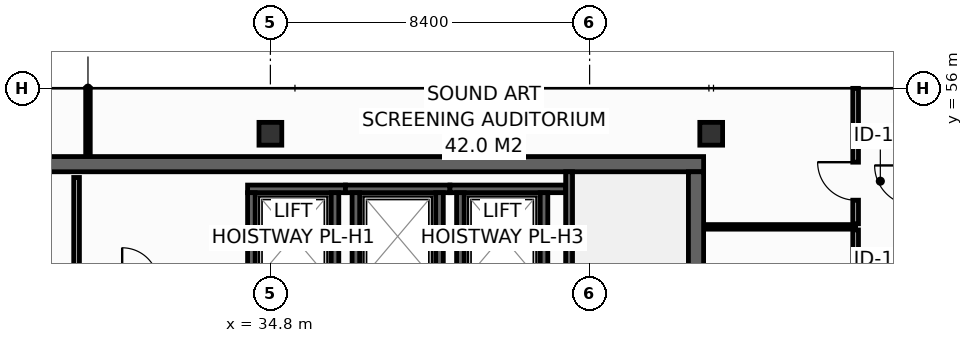
"""IFC4 building model, lengths in metres.
Left out: names, types, materials, properties, quantities, classifications, styles, units other than length and angle.
Written with IfcOpenShell. Run it as: python <this file> out.ifc"""

import sys

from ifc_helpers import new_model, si_unit, direction, frame, frame_2d, origin, origin_2d, place, context, subcontext, project, spatial, rectangle, hollow_rectangle, extrude, element, fill, save


model = new_model("IFC4")
c1 = context("Model", 3, precision=1e-05, world=origin(), true_north=direction((0.0, 1.0)))
c2 = subcontext(c1, "Body", "Model", "MODEL_VIEW")
j1 = project(units=[si_unit("LENGTHUNIT", "METRE"), si_unit("PLANEANGLEUNIT", "RADIAN")], contexts=[c1])
p1 = place(None, origin())
s1 = spatial("IfcSite", under=j1, at=p1, CompositionType="ELEMENT")
p2 = place(p1, origin())
s2 = spatial("IfcBuilding", under=s1, at=p2, CompositionType="ELEMENT")
p3 = place(p2, frame((0.0, 0.0, 291.4)))
s3 = spatial("IfcBuildingStorey", under=s2, at=p3, CompositionType="ELEMENT", Elevation=291.4)
p4 = place(p3, frame((13.7, 54.0, 0.0), z_axis=(0.0, 0.0, 1.0), x_axis=(1.0, 0.0, 0.0)))
e1 = element("IfcWall", 1, at=p4, inside=s3, PredefinedType="SHEAR", context=c2, shape_type="SweptSolid", body=[
    extrude(rectangle(XDim=32.5, YDim=0.4, at=frame_2d((16.25, 0.0))), origin(), (0.0, 0.0, 1.0), 3.55),
])
p5 = place(p3, frame((46.0, 43.4, 0.0), z_axis=(0.0, 0.0, 1.0), x_axis=(0.0, 1.0, 0.0)))
e2 = element("IfcWall", 2, at=p5, inside=s3, PredefinedType="SHEAR", context=c2, shape_type="SweptSolid", body=[
    extrude(rectangle(XDim=10.4, YDim=0.4, at=frame_2d((5.2, 0.0))), origin(), (0.0, 0.0, 1.0), 3.55),
])
for number, where, z_axis, x_axis in (
    (3, (34.8, 54.8, 0.0), (0.0, 0.0, 1.0), (1.0, 0.0, 0.0)),
    (4, (46.4, 54.8, 0.0), (0.0, 0.0, 1.0), (1.0, 0.0, 0.0)),
):
    element("IfcColumn", number, at=place(p3, frame(where, z_axis=z_axis, x_axis=x_axis)), inside=s3, PredefinedType="COLUMN", context=c2, shape_type="SweptSolid", body=[
        extrude(hollow_rectangle(XDim=0.6, YDim=0.6, WallThickness=0.028, at=origin_2d()), origin(), (0.0, 0.0, 1.0), 3.8),
    ])
p6 = place(p3, frame((34.2, 53.35, 0.0), z_axis=(0.0, 0.0, 1.0), x_axis=(1.0, 0.0, 0.0)))
e5 = element("IfcWall", 5, at=p6, inside=s3, PredefinedType="SHEAR", context=c2, shape_type="SweptSolid", body=[
    extrude(rectangle(XDim=2.575, YDim=0.2, at=frame_2d((1.288, 0.0))), origin(), (0.0, 0.0, 1.0), 3.55),
])
for number, where, z_axis, x_axis in (
    (6, (34.3, 50.95, 0.0), (0.0, 0.0, 1.0), (0.0, 1.0, 0.0)),
    (7, (36.5, 50.95, 0.0), (0.0, 0.0, 1.0), (0.0, 1.0, 0.0)),
):
    element("IfcWall", number, at=place(p3, frame(where, z_axis=z_axis, x_axis=x_axis)), inside=s3, PredefinedType="SHEAR", context=c2, shape_type="SweptSolid", body=[
        extrude(rectangle(XDim=2.3, YDim=0.2, at=frame_2d((1.15, 0.0))), origin(), (0.0, 0.0, 1.0), 3.55),
    ])
p7 = place(p3, frame((36.775, 53.35, 0.0), z_axis=(0.0, 0.0, 1.0), x_axis=(1.0, 0.0, 0.0)))
e8 = element("IfcWall", 8, at=p7, inside=s3, PredefinedType="SHEAR", context=c2, shape_type="SweptSolid", body=[
    extrude(rectangle(XDim=2.75, YDim=0.2, at=frame_2d((1.375, 0.0))), origin(), (0.0, 0.0, 1.0), 3.55),
])
for number, where, z_axis, x_axis in (
    (9, (37.05, 50.95, 0.0), (0.0, 0.0, 1.0), (0.0, 1.0, 0.0)),
    (10, (39.25, 50.95, 0.0), (0.0, 0.0, 1.0), (0.0, 1.0, 0.0)),
):
    element("IfcWall", number, at=place(p3, frame(where, z_axis=z_axis, x_axis=x_axis)), inside=s3, PredefinedType="SHEAR", context=c2, shape_type="SweptSolid", body=[
        extrude(rectangle(XDim=2.3, YDim=0.2, at=frame_2d((1.15, 0.0))), origin(), (0.0, 0.0, 1.0), 3.55),
    ])
p8 = place(p3, frame((39.525, 53.35, 0.0), z_axis=(0.0, 0.0, 1.0), x_axis=(1.0, 0.0, 0.0)))
e11 = element("IfcWall", 11, at=p8, inside=s3, PredefinedType="SHEAR", context=c2, shape_type="SweptSolid", body=[
    extrude(rectangle(XDim=3.045, YDim=0.2, at=frame_2d((1.522, 0.0))), origin(), (0.0, 0.0, 1.0), 3.55),
])
for number, where, z_axis, x_axis in (
    (12, (39.8, 50.95, 0.0), (0.0, 0.0, 1.0), (0.0, 1.0, 0.0)),
    (13, (42.0, 50.95, 0.0), (0.0, 0.0, 1.0), (0.0, 1.0, 0.0)),
):
    element("IfcWall", number, at=place(p3, frame(where, z_axis=z_axis, x_axis=x_axis)), inside=s3, PredefinedType="SHEAR", context=c2, shape_type="SweptSolid", body=[
        extrude(rectangle(XDim=2.3, YDim=0.2, at=frame_2d((1.15, 0.0))), origin(), (0.0, 0.0, 1.0), 3.55),
    ])
p9 = place(p3, frame((42.66, 53.8, 0.0), z_axis=(0.0, 0.0, 1.0), x_axis=(0.0, -1.0, 0.0)))
e14 = element("IfcWall", 14, at=p9, inside=s3, PredefinedType="SHEAR", context=c2, shape_type="SweptSolid", body=[
    extrude(rectangle(XDim=10.4, YDim=0.18, at=frame_2d((5.2, 0.0))), origin(), (0.0, 0.0, 1.0), 3.55),
])
p10 = place(p9, frame((8.99, 0.0, 0.0)))
e15 = element("IfcOpeningElement", 15, at=p10, cuts=e14, PredefinedType="OPENING", context=c2, shape_type="SweptSolid", body=[
    extrude(rectangle(XDim=1.1, YDim=2.15, at=frame_2d((0.55, 1.075))), frame((0.0, 0.1, 0.0), z_axis=(0.0, -1.0, 0.0), x_axis=(1.0, 0.0, 0.0)), (0.0, 0.0, 1.0), 0.2),
])
p11 = place(p3, frame((29.7, 50.95, 0.0), z_axis=(0.0, 0.0, 1.0), x_axis=(0.0, 1.0, 0.0)))
e16 = element("IfcWall", 16, at=p11, inside=s3, PredefinedType="PARTITIONING", context=c2, shape_type="SweptSolid", body=[
    extrude(rectangle(XDim=2.7, YDim=0.15, at=frame_2d((1.35, 0.0))), origin(), (0.0, 0.0, 1.0), 3.55),
])
p12 = place(p3, frame((46.22, 52.35, 0.0), z_axis=(0.0, 0.0, 1.0), x_axis=(1.0, 0.0, 0.0)))
e17 = element("IfcWall", 17, at=p12, inside=s3, PredefinedType="PARTITIONING", context=c2, shape_type="SweptSolid", body=[
    extrude(rectangle(XDim=3.98, YDim=0.12, at=frame_2d((1.99, 0.0))), origin(), (0.0, 0.0, 1.0), 3.55),
])
p13 = place(p3, frame((30.0, 54.22, 0.0), z_axis=(0.0, 0.0, 1.0), x_axis=(0.0, 1.0, 0.0)))
e18 = element("IfcWall", 18, at=p13, inside=s3, PredefinedType="PARTITIONING", context=c2, shape_type="SweptSolid", body=[
    extrude(rectangle(XDim=1.775, YDim=0.12, at=frame_2d((0.888, 0.0))), origin(), (0.0, 0.0, 1.0), 2.935),
])
p14 = place(p3, frame((50.2, 48.29, 0.0), z_axis=(0.0, 0.0, 1.0), x_axis=(0.0, 1.0, 0.0)))
e19 = element("IfcWall", 19, at=p14, inside=s3, PredefinedType="PARTITIONING", context=c2, shape_type="SweptSolid", body=[
    extrude(rectangle(XDim=3.98, YDim=0.15, at=frame_2d((1.99, 0.0))), origin(), (0.0, 0.0, 1.0), 3.55),
])
p15 = place(p14, frame((1.49, 0.0, 0.0)))
e20 = element("IfcOpeningElement", 20, at=p15, cuts=e19, PredefinedType="OPENING", context=c2, shape_type="SweptSolid", body=[
    extrude(rectangle(XDim=1.0, YDim=2.15, at=frame_2d((0.5, 1.075))), frame((0.0, 0.085, 0.0), z_axis=(0.0, -1.0, 0.0), x_axis=(1.0, 0.0, 0.0)), (0.0, 0.0, 1.0), 0.17),
])
p16 = place(p3, frame((50.2, 52.43, 0.0), z_axis=(0.0, 0.0, 1.0), x_axis=(0.0, 1.0, 0.0)))
e21 = element("IfcWall", 21, at=p16, inside=s3, PredefinedType="PARTITIONING", context=c2, shape_type="SweptSolid", body=[
    extrude(rectangle(XDim=3.565, YDim=0.15, at=frame_2d((1.783, 0.0))), origin(), (0.0, 0.0, 1.0), 2.935),
])
p17 = place(p16, frame((0.622, 0.0, 0.0)))
e22 = element("IfcOpeningElement", 22, at=p17, cuts=e21, PredefinedType="OPENING", context=c2, shape_type="SweptSolid", body=[
    extrude(rectangle(XDim=1.0, YDim=2.15, at=frame_2d((0.5, 1.075))), frame((0.0, 0.085, 0.0), z_axis=(0.0, -1.0, 0.0), x_axis=(1.0, 0.0, 0.0)), (0.0, 0.0, 1.0), 0.17),
])
p18 = place(p17, origin())
e23 = element("IfcDoor", 23, at=p18, inside=s3, OperationType="SINGLE_SWING_RIGHT", PredefinedType="DOOR", context=c2, shape_type="SweptSolid", body=[
    extrude(rectangle(XDim=1.0, YDim=2.15, at=frame_2d((0.5, 1.075))), frame((0.0, 0.025, 0.0), z_axis=(0.0, -1.0, 0.0), x_axis=(1.0, 0.0, 0.0)), (0.0, 0.0, 1.0), 0.05),
])
fill(e22, e23)
save(model, sys.argv[1])
